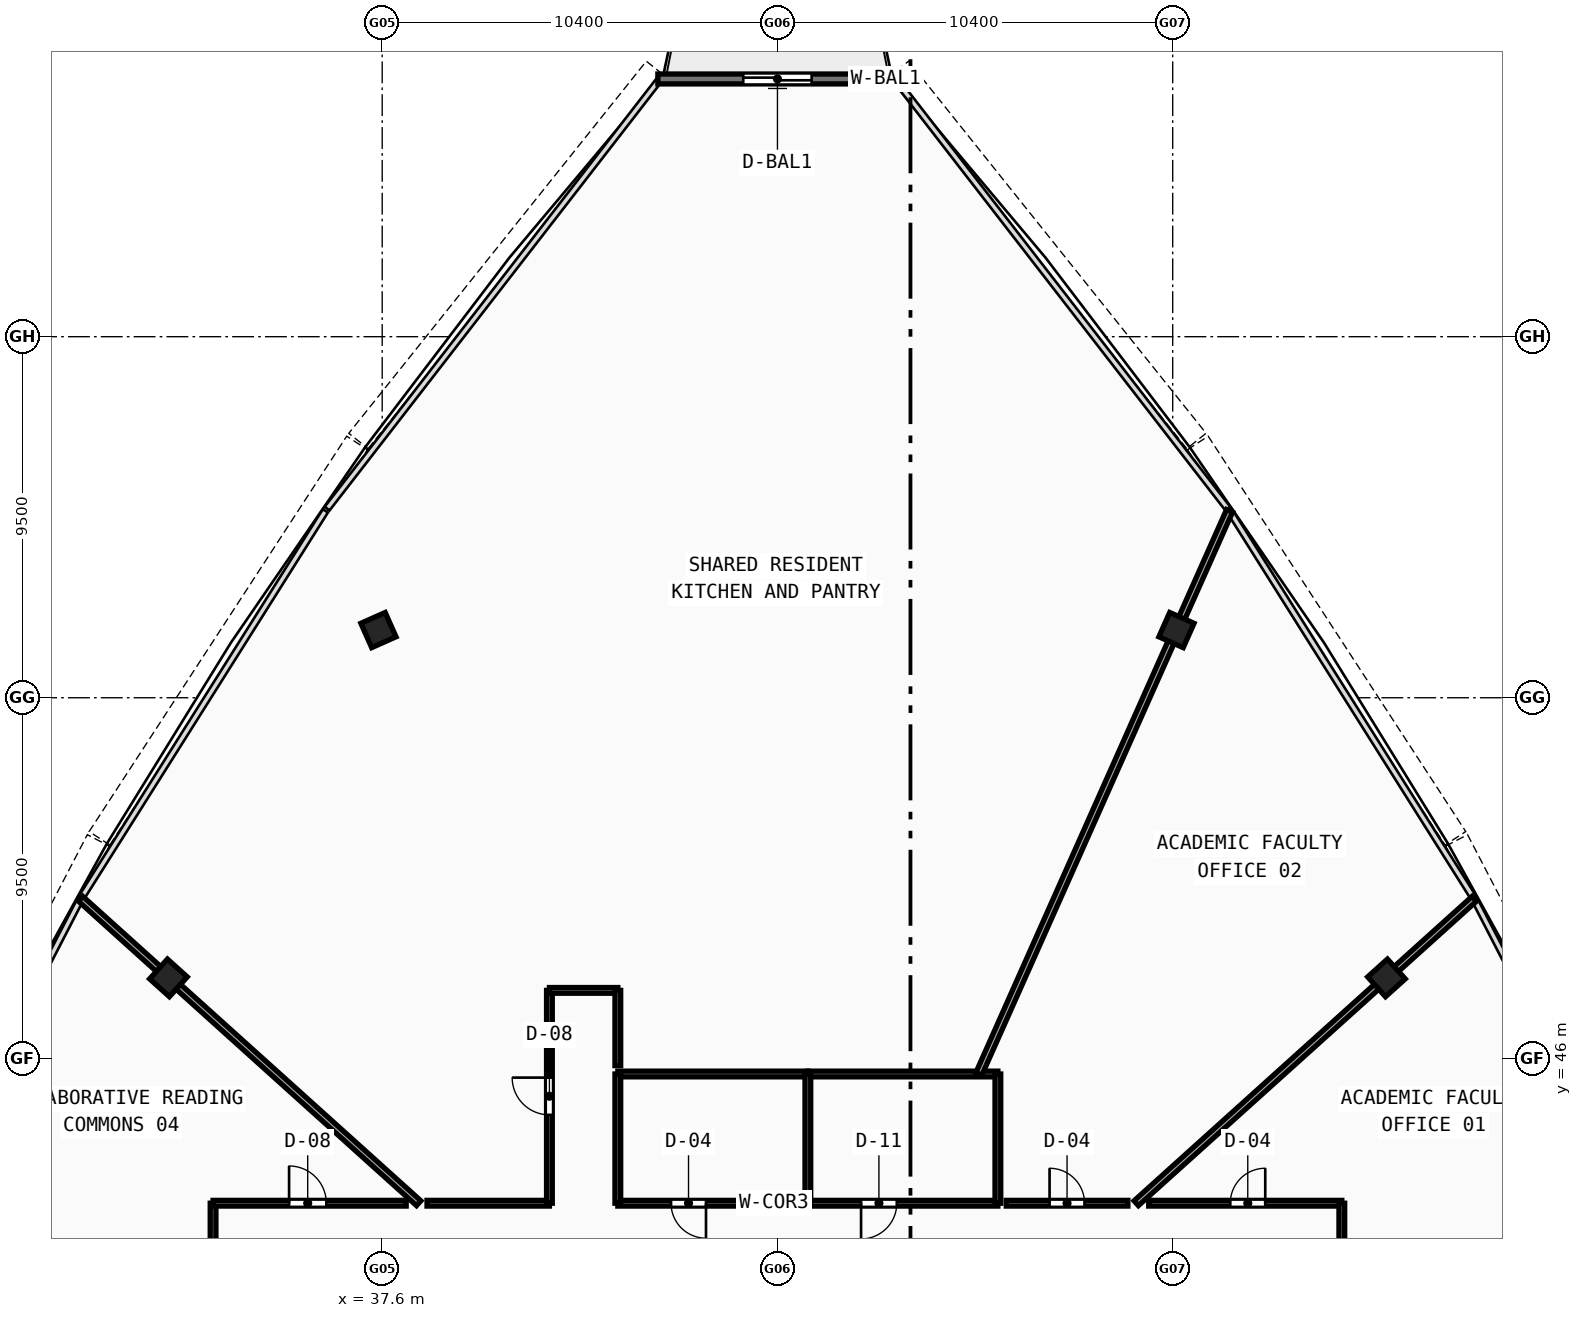
"""IFC4 building model, lengths in metres.
Left out: names, types, materials, properties, quantities, classifications, styles, units other than length and angle.
Written with IfcOpenShell. Run it as: python <this file> out.ifc"""

import sys

from ifc_helpers import new_model, si_unit, direction, frame, frame_2d, origin, origin_with_axes, origin_2d, place, context, subcontext, project, spatial, rectangle, hollow_rectangle, extrude, source, transform, mapped, element, fill, save


model = new_model("IFC4")
c1 = context("Model", 3, precision=1e-05, world=origin(), true_north=direction((0.0, 1.0)))
c2 = subcontext(c1, "Body", "Model", "MODEL_VIEW")
j1 = project(units=[si_unit("LENGTHUNIT", "METRE"), si_unit("PLANEANGLEUNIT", "RADIAN")], contexts=[c1])
p1 = place(None, origin())
s1 = spatial("IfcSite", under=j1, at=p1, CompositionType="ELEMENT")
p2 = place(p1, origin())
s2 = spatial("IfcBuilding", under=s1, at=p2, CompositionType="ELEMENT")
p3 = place(p2, frame((0.0, 0.0, 336.76)))
s3 = spatial("IfcBuildingStorey", under=s2, at=p3, CompositionType="ELEMENT", Elevation=336.76)
m1 = source(origin(), c2, "Body", "SweptSolid", [
    extrude(hollow_rectangle(XDim=0.7, YDim=0.7, WallThickness=0.026, at=origin_2d()), origin(), (0.0, 0.0, 1.0), 3.75),
])
for number, where, z_axis, x_axis in (
    (1, (64.025, 48.129, -0.26), (0.0, 0.0, 1.0), (-0.669, 0.743, 0.0)),
    (2, (58.499, 57.281, -0.26), (0.0, 0.0, 1.0), (-0.914, 0.407, 0.0)),
    (3, (37.501, 57.281, -0.26), (0.0, 0.0, 1.0), (-0.914, -0.407, 0.0)),
    (4, (31.975, 48.129, -0.26), (0.0, 0.0, 1.0), (-0.669, -0.743, 0.0)),
):
    element("IfcColumn", number, at=place(p3, frame(where, z_axis=z_axis, x_axis=x_axis)), inside=s3, PredefinedType="COLUMN", context=c2, shape_type="MappedRepresentation", body=[
        mapped(m1, transform((0.0, 0.0, 0.0), scale=1.0)),
    ])
p4 = place(p3, frame((51.146, 71.781, 0.0), z_axis=(0.0, 0.0, 1.0), x_axis=(-1.0, 0.0, 0.0)))
e5 = element("IfcWall", 5, at=p4, inside=s3, PredefinedType="STANDARD", context=c2, shape_type="SweptSolid", body=[
    extrude(rectangle(XDim=6.293, YDim=0.26, at=frame_2d((3.146, 0.0))), origin(), (0.0, 0.0, 1.0), 3.49),
])
p5 = place(p4, frame((2.246, 0.0, 0.0)))
e6 = element("IfcOpeningElement", 6, at=p5, cuts=e5, PredefinedType="OPENING", context=c2, shape_type="SweptSolid", body=[
    extrude(rectangle(XDim=1.8, YDim=2.15, at=frame_2d((0.9, 1.075))), frame((0.0, 0.14, 0.0), z_axis=(0.0, -1.0, 0.0), x_axis=(1.0, 0.0, 0.0)), (0.0, 0.0, 1.0), 0.28),
])
p6 = place(p3, frame((43.8, 42.2, 0.0), z_axis=(0.0, 0.0, 1.0), x_axis=(1.0, 0.0, 0.0)))
e7 = element("IfcWall", 7, at=p6, inside=s3, PredefinedType="PARTITIONING", context=c2, shape_type="SweptSolid", body=[
    extrude(rectangle(XDim=5.0, YDim=0.15, at=frame_2d((2.5, 0.0))), origin(), (0.0, 0.0, 1.0), 2.89),
])
p7 = place(p6, frame((1.4, 0.0, 0.0)))
e8 = element("IfcOpeningElement", 8, at=p7, cuts=e7, PredefinedType="OPENING", context=c2, shape_type="SweptSolid", body=[
    extrude(rectangle(XDim=0.92, YDim=2.1, at=frame_2d((0.46, 1.05))), frame((0.0, 0.085, 0.0), z_axis=(0.0, -1.0, 0.0), x_axis=(1.0, 0.0, 0.0)), (0.0, 0.0, 1.0), 0.17),
])
p8 = place(p3, frame((43.8, 45.6, 0.0), z_axis=(0.0, 0.0, 1.0), x_axis=(1.0, 0.0, 0.0)))
e9 = element("IfcWall", 9, at=p8, inside=s3, PredefinedType="PARTITIONING", context=c2, shape_type="SweptSolid", body=[
    extrude(rectangle(XDim=5.0, YDim=0.15, at=frame_2d((2.5, 0.0))), origin(), (0.0, 0.0, 1.0), 3.49),
])
p9 = place(p3, frame((43.8, 42.2, 0.0), z_axis=(0.0, 0.0, 1.0), x_axis=(0.0, 1.0, 0.0)))
e10 = element("IfcWall", 10, at=p9, inside=s3, PredefinedType="PARTITIONING", context=c2, shape_type="SweptSolid", body=[
    extrude(rectangle(XDim=3.4, YDim=0.15, at=frame_2d((1.7, 0.0))), origin(), (0.0, 0.0, 1.0), 2.89),
])
p10 = place(p3, frame((48.8, 42.2, 0.0), z_axis=(0.0, 0.0, 1.0), x_axis=(1.0, 0.0, 0.0)))
e11 = element("IfcWall", 11, at=p10, inside=s3, PredefinedType="PARTITIONING", context=c2, shape_type="SweptSolid", body=[
    extrude(rectangle(XDim=5.0, YDim=0.15, at=frame_2d((2.5, 0.0))), origin(), (0.0, 0.0, 1.0), 2.89),
])
p11 = place(p10, frame((1.4, 0.0, 0.0)))
e12 = element("IfcOpeningElement", 12, at=p11, cuts=e11, PredefinedType="OPENING", context=c2, shape_type="SweptSolid", body=[
    extrude(rectangle(XDim=0.94, YDim=2.1, at=frame_2d((0.47, 1.05))), frame((0.0, 0.085, 0.0), z_axis=(0.0, -1.0, 0.0), x_axis=(1.0, 0.0, 0.0)), (0.0, 0.0, 1.0), 0.17),
])
p12 = place(p3, frame((48.8, 45.6, 0.0), z_axis=(0.0, 0.0, 1.0), x_axis=(1.0, 0.0, 0.0)))
e13 = element("IfcWall", 13, at=p12, inside=s3, PredefinedType="PARTITIONING", context=c2, shape_type="SweptSolid", body=[
    extrude(rectangle(XDim=5.0, YDim=0.15, at=frame_2d((2.5, 0.0))), origin(), (0.0, 0.0, 1.0), 2.89),
])
for number, where, z_axis, x_axis in (
    (14, (48.8, 42.2, 0.0), (0.0, 0.0, 1.0), (0.0, 1.0, 0.0)),
    (15, (53.8, 42.2, 0.0), (0.0, 0.0, 1.0), (0.0, 1.0, 0.0)),
):
    element("IfcWall", number, at=place(p3, frame(where, z_axis=z_axis, x_axis=x_axis)), inside=s3, PredefinedType="PARTITIONING", context=c2, shape_type="SweptSolid", body=[
        extrude(rectangle(XDim=3.4, YDim=0.15, at=frame_2d((1.7, 0.0))), origin(), (0.0, 0.0, 1.0), 3.49),
    ])
p13 = place(p3, frame((57.44, 42.2, 0.0), z_axis=(0.0, 0.0, 1.0), x_axis=(0.743141978473, 0.669133768264, 0.0)))
e16 = element("IfcWall", 16, at=p13, inside=s3, PredefinedType="PARTITIONING", context=c2, shape_type="SweptSolid", body=[
    extrude(rectangle(XDim=11.968, YDim=0.17, at=frame_2d((5.984, 0.0))), origin(), (0.0, 0.0, 1.0), 2.89),
])
p14 = place(p3, frame((53.298, 45.6, 0.0), z_axis=(0.0, 0.0, 1.0), x_axis=(0.40675009841, 0.913539466823, 0.0)))
e17 = element("IfcWall", 17, at=p14, inside=s3, PredefinedType="PARTITIONING", context=c2, shape_type="SweptSolid", body=[
    extrude(rectangle(XDim=16.219, YDim=0.17, at=frame_2d((8.11, 0.0))), origin(), (0.0, 0.0, 1.0), 2.89),
])
p15 = place(p3, frame((38.56, 42.2, 0.0), z_axis=(0.0, 0.0, 1.0), x_axis=(-0.743141978473, 0.669133768264, 0.0)))
e18 = element("IfcWall", 18, at=p15, inside=s3, PredefinedType="PARTITIONING", context=c2, shape_type="SweptSolid", body=[
    extrude(rectangle(XDim=11.968, YDim=0.17, at=frame_2d((5.984, 0.0))), origin(), (0.0, 0.0, 1.0), 2.89),
])
p16 = place(p3, frame((33.15, 38.756, 0.0), z_axis=(0.0, 0.0, 1.0), x_axis=(0.0, 1.0, 0.0)))
e19 = element("IfcWall", 19, at=p16, inside=s3, PredefinedType="PARTITIONING", context=c2, shape_type="SweptSolid", body=[
    extrude(rectangle(XDim=3.444, YDim=0.15, at=frame_2d((1.722, 0.0))), origin(), (0.0, 0.0, 1.0), 3.14),
])
p17 = place(p3, frame((33.15, 42.2, 0.0), z_axis=(0.0, 0.0, 1.0), x_axis=(1.0, 0.0, 0.0)))
e20 = element("IfcWall", 20, at=p17, inside=s3, PredefinedType="PARTITIONING", context=c2, shape_type="SweptSolid", body=[
    extrude(rectangle(XDim=5.081, YDim=0.15, at=frame_2d((2.541, 0.0))), origin(), (0.0, 0.0, 1.0), 3.14),
])
p18 = place(p17, frame((2.0, 0.0, 0.0)))
e21 = element("IfcOpeningElement", 21, at=p18, cuts=e20, PredefinedType="OPENING", context=c2, shape_type="SweptSolid", body=[
    extrude(rectangle(XDim=0.98, YDim=2.12, at=frame_2d((0.49, 1.06))), frame((0.0, 0.085, 0.0), z_axis=(0.0, -1.0, 0.0), x_axis=(1.0, 0.0, 0.0)), (0.0, 0.0, 1.0), 0.17),
])
p19 = place(p3, frame((38.78, 42.2, 0.0), z_axis=(0.0, 0.0, 1.0), x_axis=(1.0, 0.0, 0.0)))
e22 = element("IfcWall", 22, at=p19, inside=s3, PredefinedType="PARTITIONING", context=c2, shape_type="SweptSolid", body=[
    extrude(rectangle(XDim=3.22, YDim=0.15, at=frame_2d((1.61, 0.0))), origin(), (0.0, 0.0, 1.0), 2.89),
])
p20 = place(p3, frame((42.0, 42.2, 0.0), z_axis=(0.0, 0.0, 1.0), x_axis=(0.0, 1.0, 0.0)))
e23 = element("IfcWall", 23, at=p20, inside=s3, PredefinedType="PARTITIONING", context=c2, shape_type="SweptSolid", body=[
    extrude(rectangle(XDim=5.6, YDim=0.15, at=frame_2d((2.8, 0.0))), origin(), (0.0, 0.0, 1.0), 2.89),
])
p21 = place(p20, frame((2.325, 0.0, 0.0)))
e24 = element("IfcOpeningElement", 24, at=p21, cuts=e23, PredefinedType="OPENING", context=c2, shape_type="SweptSolid", body=[
    extrude(rectangle(XDim=0.98, YDim=2.12, at=frame_2d((0.49, 1.06))), frame((0.0, 0.085, 0.0), z_axis=(0.0, -1.0, 0.0), x_axis=(1.0, 0.0, 0.0)), (0.0, 0.0, 1.0), 0.17),
])
p22 = place(p3, frame((42.0, 47.8, 0.0), z_axis=(0.0, 0.0, 1.0), x_axis=(1.0, 0.0, 0.0)))
e25 = element("IfcWall", 25, at=p22, inside=s3, PredefinedType="PARTITIONING", context=c2, shape_type="SweptSolid", body=[
    extrude(rectangle(XDim=1.8, YDim=0.15, at=frame_2d((0.9, 0.0))), origin(), (0.0, 0.0, 1.0), 3.49),
])
p23 = place(p3, frame((43.8, 47.8, 0.0), z_axis=(0.0, 0.0, 1.0), x_axis=(0.0, -1.0, 0.0)))
e26 = element("IfcWall", 26, at=p23, inside=s3, PredefinedType="PARTITIONING", context=c2, shape_type="SweptSolid", body=[
    extrude(rectangle(XDim=1.98, YDim=0.15, at=frame_2d((0.99, 0.0))), origin(), (0.0, 0.0, 1.0), 3.14),
])
p24 = place(p3, frame((54.02, 42.2, 0.0), z_axis=(0.0, 0.0, 1.0), x_axis=(1.0, 0.0, 0.0)))
e27 = element("IfcWall", 27, at=p24, inside=s3, PredefinedType="PARTITIONING", context=c2, shape_type="SweptSolid", body=[
    extrude(rectangle(XDim=3.2, YDim=0.15, at=frame_2d((1.6, 0.0))), origin(), (0.0, 0.0, 1.0), 2.89),
])
p25 = place(p24, frame((1.14, 0.0, 0.0)))
e28 = element("IfcOpeningElement", 28, at=p25, cuts=e27, PredefinedType="OPENING", context=c2, shape_type="SweptSolid", body=[
    extrude(rectangle(XDim=0.92, YDim=2.1, at=frame_2d((0.46, 1.05))), frame((0.0, 0.085, 0.0), z_axis=(0.0, -1.0, 0.0), x_axis=(1.0, 0.0, 0.0)), (0.0, 0.0, 1.0), 0.17),
])
p26 = place(p3, frame((57.769, 42.2, 0.0), z_axis=(0.0, 0.0, 1.0), x_axis=(1.0, 0.0, 0.0)))
e29 = element("IfcWall", 29, at=p26, inside=s3, PredefinedType="PARTITIONING", context=c2, shape_type="SweptSolid", body=[
    extrude(rectangle(XDim=5.081, YDim=0.15, at=frame_2d((2.541, 0.0))), origin(), (0.0, 0.0, 1.0), 3.14),
])
p27 = place(p26, frame((2.146, 0.0, 0.0)))
e30 = element("IfcOpeningElement", 30, at=p27, cuts=e29, PredefinedType="OPENING", context=c2, shape_type="SweptSolid", body=[
    extrude(rectangle(XDim=0.92, YDim=2.1, at=frame_2d((0.46, 1.05))), frame((0.0, 0.085, 0.0), z_axis=(0.0, -1.0, 0.0), x_axis=(1.0, 0.0, 0.0)), (0.0, 0.0, 1.0), 0.17),
])
p28 = place(p3, frame((62.85, 42.2, 0.0), z_axis=(0.0, 0.0, 1.0), x_axis=(0.0, -1.0, 0.0)))
e31 = element("IfcWall", 31, at=p28, inside=s3, PredefinedType="PARTITIONING", context=c2, shape_type="SweptSolid", body=[
    extrude(rectangle(XDim=3.444, YDim=0.15, at=frame_2d((1.722, 0.0))), origin(), (0.0, 0.0, 1.0), 3.14),
])
m2 = source(origin(), c2, "Body", "SweptSolid", [
    extrude(rectangle(XDim=1.8, YDim=2.15, at=frame_2d((0.9, 1.075))), frame((0.0, 0.025, 0.0), z_axis=(0.0, -1.0, 0.0), x_axis=(1.0, 0.0, 0.0)), (0.0, 0.0, 1.0), 0.05),
])
p29 = place(p5, origin_with_axes())
e32 = element("IfcDoor", 32, at=p29, inside=s3, OperationType="DOUBLE_DOOR_SLIDING", PredefinedType="DOOR", context=c2, shape_type="MappedRepresentation", body=[
    mapped(m2, transform((0.0, 0.0, 0.0), scale=1.0)),
])
fill(e6, e32)
m3 = source(origin(), c2, "Body", "SweptSolid", [
    extrude(rectangle(XDim=0.92, YDim=2.1, at=frame_2d((0.46, 1.05))), frame((0.0, 0.025, 0.0), z_axis=(0.0, -1.0, 0.0), x_axis=(1.0, 0.0, 0.0)), (0.0, 0.0, 1.0), 0.05),
])
p30 = place(p7, frame((0.92, 0.0, 0.0), z_axis=(0.0, 0.0, 1.0), x_axis=(-1.0, 0.0, 0.0)))
e33 = element("IfcDoor", 33, at=p30, inside=s3, OperationType="SINGLE_SWING_LEFT", PredefinedType="DOOR", context=c2, shape_type="MappedRepresentation", body=[
    mapped(m3, transform((0.0, 0.0, 0.0), scale=1.0)),
])
fill(e8, e33)
m4 = source(origin(), c2, "Body", "SweptSolid", [
    extrude(rectangle(XDim=0.94, YDim=2.1, at=frame_2d((0.47, 1.05))), frame((0.0, 0.025, 0.0), z_axis=(0.0, -1.0, 0.0), x_axis=(1.0, 0.0, 0.0)), (0.0, 0.0, 1.0), 0.05),
])
p31 = place(p11, frame((0.94, 0.0, 0.0), z_axis=(0.0, 0.0, 1.0), x_axis=(-1.0, 0.0, 0.0)))
e34 = element("IfcDoor", 34, at=p31, inside=s3, OperationType="SINGLE_SWING_RIGHT", PredefinedType="DOOR", context=c2, shape_type="MappedRepresentation", body=[
    mapped(m4, transform((0.0, 0.0, 0.0), scale=1.0)),
])
fill(e12, e34)
p32 = place(p27, origin_with_axes())
e35 = element("IfcDoor", 35, at=p32, inside=s3, OperationType="SINGLE_SWING_RIGHT", PredefinedType="DOOR", context=c2, shape_type="MappedRepresentation", body=[
    mapped(m3, transform((0.0, 0.0, 0.0), scale=1.0)),
])
fill(e30, e35)
p33 = place(p25, origin_with_axes())
e36 = element("IfcDoor", 36, at=p33, inside=s3, OperationType="SINGLE_SWING_LEFT", PredefinedType="DOOR", context=c2, shape_type="MappedRepresentation", body=[
    mapped(m3, transform((0.0, 0.0, 0.0), scale=1.0)),
])
fill(e28, e36)
m5 = source(origin(), c2, "Body", "SweptSolid", [
    extrude(rectangle(XDim=0.98, YDim=2.12, at=frame_2d((0.49, 1.06))), frame((0.0, 0.025, 0.0), z_axis=(0.0, -1.0, 0.0), x_axis=(1.0, 0.0, 0.0)), (0.0, 0.0, 1.0), 0.05),
])
p34 = place(p21, origin_with_axes())
e37 = element("IfcDoor", 37, at=p34, inside=s3, OperationType="SINGLE_SWING_RIGHT", PredefinedType="DOOR", context=c2, shape_type="MappedRepresentation", body=[
    mapped(m5, transform((0.0, 0.0, 0.0), scale=1.0)),
])
fill(e24, e37)
p35 = place(p18, origin_with_axes())
e38 = element("IfcDoor", 38, at=p35, inside=s3, OperationType="SINGLE_SWING_LEFT", PredefinedType="DOOR", context=c2, shape_type="MappedRepresentation", body=[
    mapped(m5, transform((0.0, 0.0, 0.0), scale=1.0)),
])
fill(e21, e38)
save(model, sys.argv[1])
